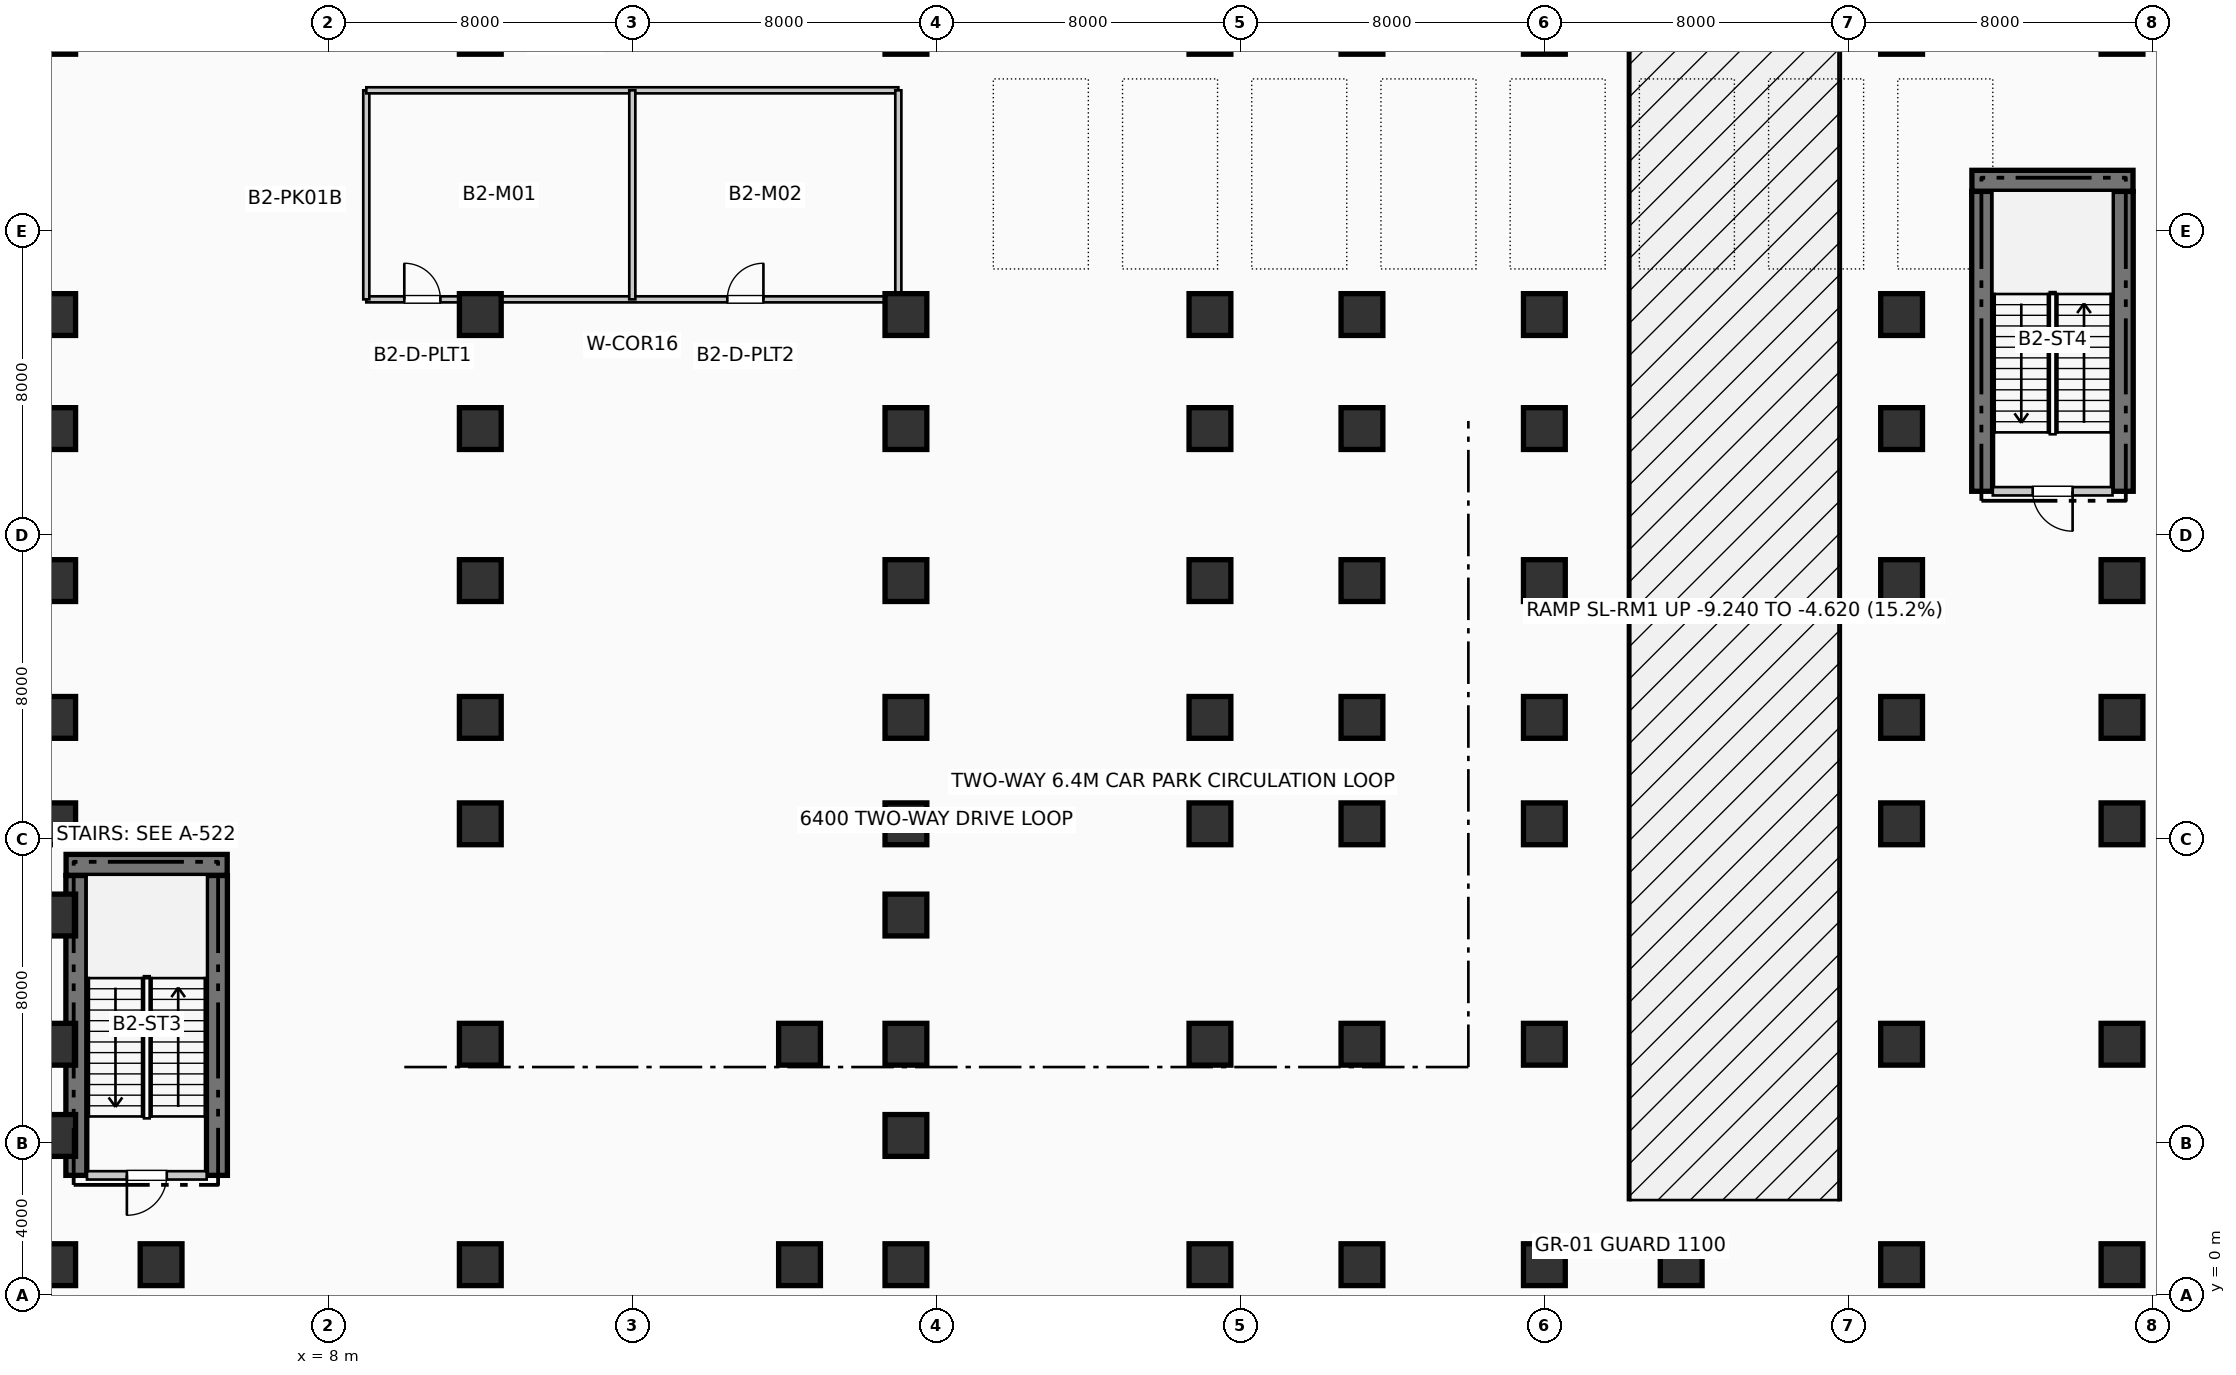
"""IFC4 building model, lengths in metres.
Left out: names, types, materials, properties, quantities, classifications, styles, units other than length and angle.
Written with IfcOpenShell. Run it as: python <this file> out.ifc"""

import sys

from ifc_helpers import new_model, si_unit, direction, frame, frame_2d, origin, origin_2d, place, context, subcontext, project, spatial, rectangle, extrude, element, fill, save


model = new_model("IFC4")
c1 = context("Model", 3, precision=1e-05, world=origin(), true_north=direction((0.0, 1.0)))
c2 = subcontext(c1, "Body", "Model", "MODEL_VIEW")
j1 = project(units=[si_unit("LENGTHUNIT", "METRE"), si_unit("PLANEANGLEUNIT", "RADIAN")], contexts=[c1])
p1 = place(None, origin())
s1 = spatial("IfcSite", under=j1, at=p1, CompositionType="ELEMENT")
p2 = place(p1, origin())
s2 = spatial("IfcBuilding", under=s1, at=p2, CompositionType="ELEMENT")
p3 = place(p2, frame((0.0, 0.0, -9.24)))
s3 = spatial("IfcBuildingStorey", under=s2, at=p3, CompositionType="ELEMENT", Elevation=-9.24)
for number, where, z_axis, x_axis in (
    (1, (1.37, 3.15, 0.0), (0.0, 0.0, 1.0), (0.0, 1.0, 0.0)),
    (2, (5.07, 3.15, 0.0), (0.0, 0.0, 1.0), (0.0, 1.0, 0.0)),
):
    element("IfcWall", number, at=place(p3, frame(where, z_axis=z_axis, x_axis=x_axis)), inside=s3, PredefinedType="SHEAR", context=c2, shape_type="SweptSolid", body=[
        extrude(rectangle(XDim=7.89, YDim=0.55, at=frame_2d((3.945, 0.0))), origin(), (0.0, 0.0, 1.0), 4.62),
    ])
p4 = place(p3, frame((1.1, 11.32, 0.0), z_axis=(0.0, 0.0, 1.0), x_axis=(1.0, 0.0, 0.0)))
e3 = element("IfcWall", 3, at=p4, inside=s3, PredefinedType="SHEAR", context=c2, shape_type="SweptSolid", body=[
    extrude(rectangle(XDim=4.24, YDim=0.55, at=frame_2d((2.12, 0.0))), origin(), (0.0, 0.0, 1.0), 4.62),
])
for number, where, z_axis, x_axis in (
    (4, (51.52, 21.15, 0.0), (0.0, 0.0, 1.0), (0.0, 1.0, 0.0)),
    (5, (55.22, 21.15, 0.0), (0.0, 0.0, 1.0), (0.0, 1.0, 0.0)),
):
    element("IfcWall", number, at=place(p3, frame(where, z_axis=z_axis, x_axis=x_axis)), inside=s3, PredefinedType="SHEAR", context=c2, shape_type="SweptSolid", body=[
        extrude(rectangle(XDim=7.89, YDim=0.55, at=frame_2d((3.945, 0.0))), origin(), (0.0, 0.0, 1.0), 4.62),
    ])
p5 = place(p3, frame((51.25, 29.32, 0.0), z_axis=(0.0, 0.0, 1.0), x_axis=(1.0, 0.0, 0.0)))
e6 = element("IfcWall", 6, at=p5, inside=s3, PredefinedType="SHEAR", context=c2, shape_type="SweptSolid", body=[
    extrude(rectangle(XDim=4.24, YDim=0.55, at=frame_2d((2.12, 0.0))), origin(), (0.0, 0.0, 1.0), 4.62),
])
for number, where, z_axis, x_axis in (
    (7, (0.8, 0.8, 0.0), (0.0, 0.0, 1.0), (1.0, 0.0, 0.0)),
    (8, (0.8, 4.2, 0.0), (0.0, 0.0, 1.0), (1.0, 0.0, 0.0)),
    (9, (0.8, 6.6, 0.0), (0.0, 0.0, 1.0), (1.0, 0.0, 0.0)),
    (10, (0.8, 10.0, 0.0), (0.0, 0.0, 1.0), (1.0, 0.0, 0.0)),
    (11, (0.8, 12.4, 0.0), (0.0, 0.0, 1.0), (1.0, 0.0, 0.0)),
    (12, (0.8, 15.2, 0.0), (0.0, 0.0, 1.0), (1.0, 0.0, 0.0)),
    (13, (0.8, 18.8, 0.0), (0.0, 0.0, 1.0), (1.0, 0.0, 0.0)),
    (14, (0.8, 22.8, 0.0), (0.0, 0.0, 1.0), (1.0, 0.0, 0.0)),
    (15, (0.8, 25.8, 0.0), (0.0, 0.0, 1.0), (1.0, 0.0, 0.0)),
    (16, (0.8, 33.2, 0.0), (0.0, 0.0, 1.0), (1.0, 0.0, 0.0)),
    (17, (3.6, 0.8, 0.0), (0.0, 0.0, 1.0), (1.0, 0.0, 0.0)),
    (18, (12.0, 0.8, 0.0), (0.0, 0.0, 1.0), (1.0, 0.0, 0.0)),
    (19, (12.0, 6.6, 0.0), (0.0, 0.0, 1.0), (1.0, 0.0, 0.0)),
    (20, (12.0, 12.4, 0.0), (0.0, 0.0, 1.0), (1.0, 0.0, 0.0)),
    (21, (12.0, 15.2, 0.0), (0.0, 0.0, 1.0), (1.0, 0.0, 0.0)),
    (22, (12.0, 18.8, 0.0), (0.0, 0.0, 1.0), (1.0, 0.0, 0.0)),
    (23, (12.0, 22.8, 0.0), (0.0, 0.0, 1.0), (1.0, 0.0, 0.0)),
    (24, (12.0, 25.8, 0.0), (0.0, 0.0, 1.0), (1.0, 0.0, 0.0)),
    (25, (12.0, 33.2, 0.0), (0.0, 0.0, 1.0), (1.0, 0.0, 0.0)),
    (26, (20.4, 0.8, 0.0), (0.0, 0.0, 1.0), (1.0, 0.0, 0.0)),
    (27, (20.4, 6.6, 0.0), (0.0, 0.0, 1.0), (1.0, 0.0, 0.0)),
    (28, (23.2, 0.8, 0.0), (0.0, 0.0, 1.0), (1.0, 0.0, 0.0)),
    (29, (23.2, 4.2, 0.0), (0.0, 0.0, 1.0), (1.0, 0.0, 0.0)),
    (30, (23.2, 6.6, 0.0), (0.0, 0.0, 1.0), (1.0, 0.0, 0.0)),
    (31, (23.2, 10.0, 0.0), (0.0, 0.0, 1.0), (1.0, 0.0, 0.0)),
    (32, (23.2, 12.4, 0.0), (0.0, 0.0, 1.0), (1.0, 0.0, 0.0)),
    (33, (23.2, 15.2, 0.0), (0.0, 0.0, 1.0), (1.0, 0.0, 0.0)),
    (34, (23.2, 18.8, 0.0), (0.0, 0.0, 1.0), (1.0, 0.0, 0.0)),
    (35, (23.2, 22.8, 0.0), (0.0, 0.0, 1.0), (1.0, 0.0, 0.0)),
    (36, (23.2, 25.8, 0.0), (0.0, 0.0, 1.0), (1.0, 0.0, 0.0)),
    (37, (23.2, 33.2, 0.0), (0.0, 0.0, 1.0), (1.0, 0.0, 0.0)),
    (38, (31.2, 0.8, 0.0), (0.0, 0.0, 1.0), (1.0, 0.0, 0.0)),
    (39, (31.2, 6.6, 0.0), (0.0, 0.0, 1.0), (1.0, 0.0, 0.0)),
    (40, (31.2, 12.4, 0.0), (0.0, 0.0, 1.0), (1.0, 0.0, 0.0)),
    (41, (31.2, 15.2, 0.0), (0.0, 0.0, 1.0), (1.0, 0.0, 0.0)),
    (42, (31.2, 18.8, 0.0), (0.0, 0.0, 1.0), (1.0, 0.0, 0.0)),
    (43, (31.2, 22.8, 0.0), (0.0, 0.0, 1.0), (1.0, 0.0, 0.0)),
    (44, (31.2, 25.8, 0.0), (0.0, 0.0, 1.0), (1.0, 0.0, 0.0)),
    (45, (31.2, 33.2, 0.0), (0.0, 0.0, 1.0), (1.0, 0.0, 0.0)),
    (46, (35.2, 0.8, 0.0), (0.0, 0.0, 1.0), (1.0, 0.0, 0.0)),
    (47, (35.2, 6.6, 0.0), (0.0, 0.0, 1.0), (1.0, 0.0, 0.0)),
    (48, (35.2, 12.4, 0.0), (0.0, 0.0, 1.0), (1.0, 0.0, 0.0)),
    (49, (35.2, 15.2, 0.0), (0.0, 0.0, 1.0), (1.0, 0.0, 0.0)),
    (50, (35.2, 18.8, 0.0), (0.0, 0.0, 1.0), (1.0, 0.0, 0.0)),
    (51, (35.2, 22.8, 0.0), (0.0, 0.0, 1.0), (1.0, 0.0, 0.0)),
    (52, (35.2, 25.8, 0.0), (0.0, 0.0, 1.0), (1.0, 0.0, 0.0)),
    (53, (35.2, 33.2, 0.0), (0.0, 0.0, 1.0), (1.0, 0.0, 0.0)),
    (54, (40.0, 0.8, 0.0), (0.0, 0.0, 1.0), (1.0, 0.0, 0.0)),
    (55, (40.0, 6.6, 0.0), (0.0, 0.0, 1.0), (1.0, 0.0, 0.0)),
    (56, (40.0, 12.4, 0.0), (0.0, 0.0, 1.0), (1.0, 0.0, 0.0)),
    (57, (40.0, 15.2, 0.0), (0.0, 0.0, 1.0), (1.0, 0.0, 0.0)),
    (58, (40.0, 18.8, 0.0), (0.0, 0.0, 1.0), (1.0, 0.0, 0.0)),
    (59, (40.0, 22.8, 0.0), (0.0, 0.0, 1.0), (1.0, 0.0, 0.0)),
    (60, (40.0, 25.8, 0.0), (0.0, 0.0, 1.0), (1.0, 0.0, 0.0)),
    (61, (40.0, 33.2, 0.0), (0.0, 0.0, 1.0), (1.0, 0.0, 0.0)),
    (62, (43.6, 0.8, 0.0), (0.0, 0.0, 1.0), (1.0, 0.0, 0.0)),
    (63, (49.4, 0.8, 0.0), (0.0, 0.0, 1.0), (1.0, 0.0, 0.0)),
    (64, (49.4, 6.6, 0.0), (0.0, 0.0, 1.0), (1.0, 0.0, 0.0)),
    (65, (49.4, 12.4, 0.0), (0.0, 0.0, 1.0), (1.0, 0.0, 0.0)),
    (66, (49.4, 15.2, 0.0), (0.0, 0.0, 1.0), (1.0, 0.0, 0.0)),
    (67, (49.4, 18.8, 0.0), (0.0, 0.0, 1.0), (1.0, 0.0, 0.0)),
    (68, (49.4, 22.8, 0.0), (0.0, 0.0, 1.0), (1.0, 0.0, 0.0)),
    (69, (49.4, 25.8, 0.0), (0.0, 0.0, 1.0), (1.0, 0.0, 0.0)),
    (70, (49.4, 33.2, 0.0), (0.0, 0.0, 1.0), (1.0, 0.0, 0.0)),
    (71, (55.2, 0.8, 0.0), (0.0, 0.0, 1.0), (1.0, 0.0, 0.0)),
    (72, (55.2, 6.6, 0.0), (0.0, 0.0, 1.0), (1.0, 0.0, 0.0)),
    (73, (55.2, 12.4, 0.0), (0.0, 0.0, 1.0), (1.0, 0.0, 0.0)),
    (74, (55.2, 15.2, 0.0), (0.0, 0.0, 1.0), (1.0, 0.0, 0.0)),
    (75, (55.2, 18.8, 0.0), (0.0, 0.0, 1.0), (1.0, 0.0, 0.0)),
    (76, (55.2, 33.2, 0.0), (0.0, 0.0, 1.0), (1.0, 0.0, 0.0)),
):
    element("IfcColumn", number, at=place(p3, frame(where, z_axis=z_axis, x_axis=x_axis)), inside=s3, PredefinedType="COLUMN", context=c2, shape_type="SweptSolid", body=[
        extrude(rectangle(XDim=1.1, YDim=1.1, at=origin_2d()), origin(), (0.0, 0.0, 1.0), 4.62),
    ])
p6 = place(p3, frame((1.65, 3.15, 0.0), z_axis=(0.0, 0.0, 1.0), x_axis=(1.0, 0.0, 0.0)))
e77 = element("IfcWall", 77, at=p6, inside=s3, PredefinedType="PARTITIONING", context=c2, shape_type="SweptSolid", body=[
    extrude(rectangle(XDim=3.15, YDim=0.22, at=frame_2d((1.575, 0.0))), origin(), (0.0, 0.0, 1.0), 4.27),
])
p7 = place(p6, frame((2.1, 0.0, 0.0), z_axis=(0.0, 0.0, 1.0), x_axis=(-1.0, 0.0, 0.0)))
e78 = element("IfcOpeningElement", 78, at=p7, cuts=e77, PredefinedType="OPENING", context=c2, shape_type="SweptSolid", body=[
    extrude(rectangle(XDim=1.05, YDim=2.15, at=frame_2d((0.525, 1.075))), frame((0.0, 0.12, 0.0), z_axis=(0.0, -1.0, 0.0), x_axis=(1.0, 0.0, 0.0)), (0.0, 0.0, 1.0), 0.24),
])
p8 = place(p3, frame((51.8, 21.15, 0.0), z_axis=(0.0, 0.0, 1.0), x_axis=(1.0, 0.0, 0.0)))
e79 = element("IfcWall", 79, at=p8, inside=s3, PredefinedType="PARTITIONING", context=c2, shape_type="SweptSolid", body=[
    extrude(rectangle(XDim=3.15, YDim=0.22, at=frame_2d((1.575, 0.0))), origin(), (0.0, 0.0, 1.0), 4.27),
])
p9 = place(p8, frame((2.1, 0.0, 0.0), z_axis=(0.0, 0.0, 1.0), x_axis=(-1.0, 0.0, 0.0)))
e80 = element("IfcOpeningElement", 80, at=p9, cuts=e79, PredefinedType="OPENING", context=c2, shape_type="SweptSolid", body=[
    extrude(rectangle(XDim=1.05, YDim=2.15, at=frame_2d((0.525, 1.075))), frame((0.0, 0.12, 0.0), z_axis=(0.0, -1.0, 0.0), x_axis=(1.0, 0.0, 0.0)), (0.0, 0.0, 1.0), 0.24),
])
p10 = place(p3, frame((9.0, 26.2, 0.0), z_axis=(0.0, 0.0, 1.0), x_axis=(1.0, 0.0, 0.0)))
e81 = element("IfcWall", 81, at=p10, inside=s3, PredefinedType="PARTITIONING", context=c2, shape_type="SweptSolid", body=[
    extrude(rectangle(XDim=14.0, YDim=0.16, at=frame_2d((7.0, 0.0))), origin(), (0.0, 0.0, 1.0), 3.455),
])
p11 = place(p10, frame((1.0, 0.0, 0.0)))
e82 = element("IfcOpeningElement", 82, at=p11, cuts=e81, PredefinedType="OPENING", context=c2, shape_type="SweptSolid", body=[
    extrude(rectangle(XDim=0.95, YDim=2.1, at=frame_2d((0.475, 1.05))), frame((0.0, 0.09, 0.0), z_axis=(0.0, -1.0, 0.0), x_axis=(1.0, 0.0, 0.0)), (0.0, 0.0, 1.0), 0.18),
])
p12 = place(p10, frame((9.5, 0.0, 0.0)))
e83 = element("IfcOpeningElement", 83, at=p12, cuts=e81, PredefinedType="OPENING", context=c2, shape_type="SweptSolid", body=[
    extrude(rectangle(XDim=0.95, YDim=2.1, at=frame_2d((0.475, 1.05))), frame((0.0, 0.09, 0.0), z_axis=(0.0, -1.0, 0.0), x_axis=(1.0, 0.0, 0.0)), (0.0, 0.0, 1.0), 0.18),
])
p13 = place(p3, frame((9.0, 26.2, 0.0), z_axis=(0.0, 0.0, 1.0), x_axis=(0.0, 1.0, 0.0)))
e84 = element("IfcWall", 84, at=p13, inside=s3, PredefinedType="PARTITIONING", context=c2, shape_type="SweptSolid", body=[
    extrude(rectangle(XDim=5.5, YDim=0.16, at=frame_2d((2.75, 0.0))), origin(), (0.0, 0.0, 1.0), 4.27),
])
p14 = place(p3, frame((9.0, 31.7, 0.0), z_axis=(0.0, 0.0, 1.0), x_axis=(1.0, 0.0, 0.0)))
e85 = element("IfcWall", 85, at=p14, inside=s3, PredefinedType="PARTITIONING", context=c2, shape_type="SweptSolid", body=[
    extrude(rectangle(XDim=14.0, YDim=0.16, at=frame_2d((7.0, 0.0))), origin(), (0.0, 0.0, 1.0), 4.27),
])
p15 = place(p3, frame((23.0, 26.2, 0.0), z_axis=(0.0, 0.0, 1.0), x_axis=(0.0, 1.0, 0.0)))
e86 = element("IfcWall", 86, at=p15, inside=s3, PredefinedType="PARTITIONING", context=c2, shape_type="SweptSolid", body=[
    extrude(rectangle(XDim=5.5, YDim=0.16, at=frame_2d((2.75, 0.0))), origin(), (0.0, 0.0, 1.0), 3.455),
])
p16 = place(p3, frame((16.0, 26.2, 0.0), z_axis=(0.0, 0.0, 1.0), x_axis=(0.0, 1.0, 0.0)))
e87 = element("IfcWall", 87, at=p16, inside=s3, PredefinedType="PARTITIONING", context=c2, shape_type="SweptSolid", body=[
    extrude(rectangle(XDim=5.5, YDim=0.16, at=frame_2d((2.75, 0.0))), origin(), (0.0, 0.0, 1.0), 4.27),
])
p17 = place(p7, origin())
e88 = element("IfcDoor", 88, at=p17, inside=s3, OperationType="SINGLE_SWING_LEFT", PredefinedType="DOOR", context=c2, shape_type="SweptSolid", body=[
    extrude(rectangle(XDim=1.05, YDim=2.15, at=frame_2d((0.525, 1.075))), frame((0.0, 0.025, 0.0), z_axis=(0.0, -1.0, 0.0), x_axis=(1.0, 0.0, 0.0)), (0.0, 0.0, 1.0), 0.05),
])
fill(e78, e88)
p18 = place(p9, origin())
e89 = element("IfcDoor", 89, at=p18, inside=s3, OperationType="SINGLE_SWING_RIGHT", PredefinedType="DOOR", context=c2, shape_type="SweptSolid", body=[
    extrude(rectangle(XDim=1.05, YDim=2.15, at=frame_2d((0.525, 1.075))), frame((0.0, 0.025, 0.0), z_axis=(0.0, -1.0, 0.0), x_axis=(1.0, 0.0, 0.0)), (0.0, 0.0, 1.0), 0.05),
])
fill(e80, e89)
p19 = place(p11, origin())
e90 = element("IfcDoor", 90, at=p19, inside=s3, OperationType="SINGLE_SWING_LEFT", PredefinedType="DOOR", context=c2, shape_type="SweptSolid", body=[
    extrude(rectangle(XDim=0.95, YDim=2.1, at=frame_2d((0.475, 1.05))), frame((0.0, 0.025, 0.0), z_axis=(0.0, -1.0, 0.0), x_axis=(1.0, 0.0, 0.0)), (0.0, 0.0, 1.0), 0.05),
])
fill(e82, e90)
p20 = place(p12, origin())
e91 = element("IfcDoor", 91, at=p20, inside=s3, OperationType="SINGLE_SWING_RIGHT", PredefinedType="DOOR", context=c2, shape_type="SweptSolid", body=[
    extrude(rectangle(XDim=0.95, YDim=2.1, at=frame_2d((0.475, 1.05))), frame((0.0, 0.025, 0.0), z_axis=(0.0, -1.0, 0.0), x_axis=(1.0, 0.0, 0.0)), (0.0, 0.0, 1.0), 0.05),
])
fill(e83, e91)
save(model, sys.argv[1])
